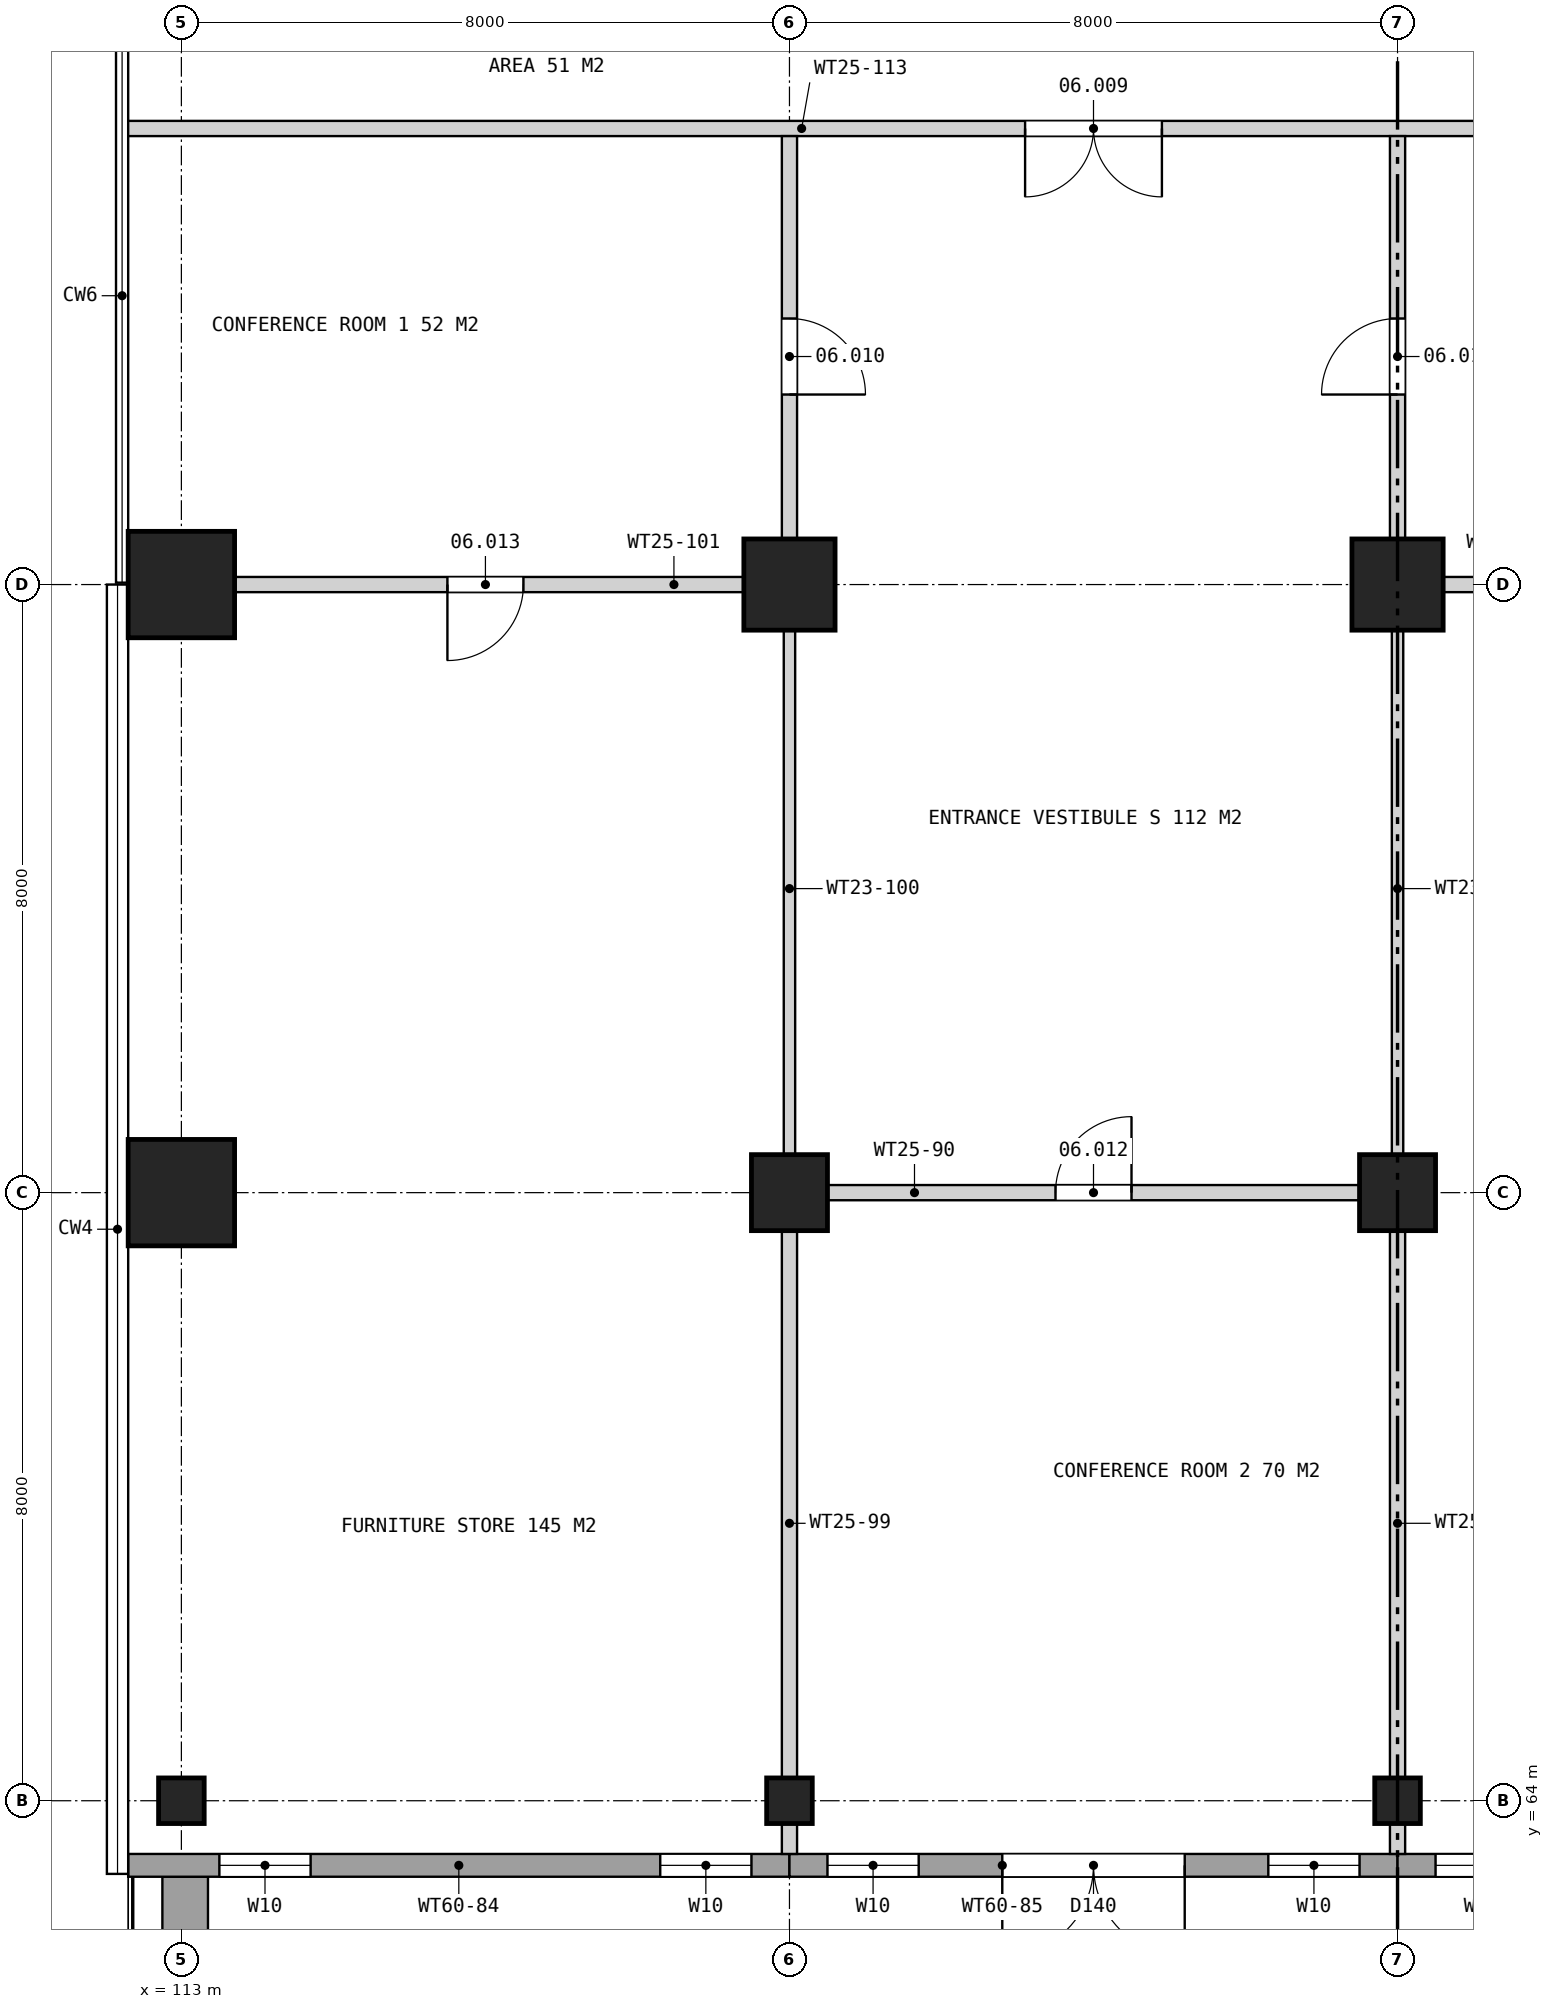
"""IFC4 building model, lengths in metres.
Left out: names, types, materials, properties, quantities, classifications, styles, units other than length and angle.
Written with IfcOpenShell. Run it as: python <this file> out.ifc"""

import sys

from ifc_helpers import new_model, si_unit, direction, frame, frame_2d, origin, origin_2d, place, context, subcontext, project, spatial, rectangle, extrude, element, fill, save


model = new_model("IFC4")
c1 = context("Model", 3, precision=1e-05, world=origin(), true_north=direction((0.0, 1.0)))
c2 = subcontext(c1, "Body", "Model", "MODEL_VIEW")
j1 = project(units=[si_unit("LENGTHUNIT", "METRE"), si_unit("PLANEANGLEUNIT", "RADIAN")], contexts=[c1])
p1 = place(None, origin())
s1 = spatial("IfcSite", under=j1, at=p1, CompositionType="ELEMENT")
p2 = place(p1, origin())
s2 = spatial("IfcBuilding", under=s1, at=p2, CompositionType="ELEMENT")
p3 = place(p2, frame((0.0, 0.0, 47.5)))
s3 = spatial("IfcBuildingStorey", under=s2, at=p3, CompositionType="ELEMENT", Elevation=47.5)
p4 = place(p3, frame((113.0, 64.0, 0.0), z_axis=(0.0, 0.0, 1.0), x_axis=(1.0, 0.0, 0.0)))
e1 = element("IfcColumn", 1, at=p4, inside=s3, PredefinedType="COLUMN", context=c2, shape_type="SweptSolid", body=[
    extrude(rectangle(XDim=0.6, YDim=0.6, at=origin_2d()), origin(), (0.0, 0.0, 1.0), 6.0),
])
for number, where, z_axis, x_axis in (
    (2, (113.0, 72.0, 0.0), (0.0, 0.0, 1.0), (1.0, 0.0, 0.0)),
    (3, (113.0, 80.0, 0.0), (0.0, 0.0, 1.0), (1.0, 0.0, 0.0)),
):
    element("IfcColumn", number, at=place(p3, frame(where, z_axis=z_axis, x_axis=x_axis)), inside=s3, PredefinedType="COLUMN", context=c2, shape_type="SweptSolid", body=[
        extrude(rectangle(XDim=1.4, YDim=1.4, at=origin_2d()), origin(), (0.0, 0.0, 1.0), 6.0),
    ])
p5 = place(p3, frame((121.0, 64.0, 5.2), z_axis=(0.0, 0.0, 1.0), x_axis=(1.0, 0.0, 0.0)))
e4 = element("IfcColumn", 4, at=p5, inside=s3, PredefinedType="COLUMN", context=c2, shape_type="SweptSolid", body=[
    extrude(rectangle(XDim=0.6, YDim=0.6, at=origin_2d()), origin(), (0.0, 0.0, 1.0), 0.8),
])
p6 = place(p3, frame((121.0, 72.0, 5.2), z_axis=(0.0, 0.0, 1.0), x_axis=(1.0, 0.0, 0.0)))
e5 = element("IfcColumn", 5, at=p6, inside=s3, PredefinedType="COLUMN", context=c2, shape_type="SweptSolid", body=[
    extrude(rectangle(XDim=1.0, YDim=1.0, at=origin_2d()), origin(), (0.0, 0.0, 1.0), 0.8),
])
p7 = place(p3, frame((121.0, 80.0, 5.2), z_axis=(0.0, 0.0, 1.0), x_axis=(1.0, 0.0, 0.0)))
e6 = element("IfcColumn", 6, at=p7, inside=s3, PredefinedType="COLUMN", context=c2, shape_type="SweptSolid", body=[
    extrude(rectangle(XDim=1.2, YDim=1.2, at=origin_2d()), origin(), (0.0, 0.0, 1.0), 0.8),
])
p8 = place(p3, frame((129.0, 64.0, 5.2), z_axis=(0.0, 0.0, 1.0), x_axis=(1.0, 0.0, 0.0)))
e7 = element("IfcColumn", 7, at=p8, inside=s3, PredefinedType="COLUMN", context=c2, shape_type="SweptSolid", body=[
    extrude(rectangle(XDim=0.6, YDim=0.6, at=origin_2d()), origin(), (0.0, 0.0, 1.0), 0.8),
])
p9 = place(p3, frame((129.0, 72.0, 5.2), z_axis=(0.0, 0.0, 1.0), x_axis=(1.0, 0.0, 0.0)))
e8 = element("IfcColumn", 8, at=p9, inside=s3, PredefinedType="COLUMN", context=c2, shape_type="SweptSolid", body=[
    extrude(rectangle(XDim=1.0, YDim=1.0, at=origin_2d()), origin(), (0.0, 0.0, 1.0), 0.8),
])
p10 = place(p3, frame((129.0, 80.0, 5.2), z_axis=(0.0, 0.0, 1.0), x_axis=(1.0, 0.0, 0.0)))
e9 = element("IfcColumn", 9, at=p10, inside=s3, PredefinedType="COLUMN", context=c2, shape_type="SweptSolid", body=[
    extrude(rectangle(XDim=1.2, YDim=1.2, at=origin_2d()), origin(), (0.0, 0.0, 1.0), 0.8),
])
p11 = place(p3, frame((113.05, 56.35, 0.0), z_axis=(0.0, 0.0, 1.0), x_axis=(0.0, 1.0, 0.0)))
e10 = element("IfcWall", 10, at=p11, inside=s3, PredefinedType="SOLIDWALL", context=c2, shape_type="SweptSolid", body=[
    extrude(rectangle(XDim=6.65, YDim=0.6, at=frame_2d((3.325, 0.0))), origin(), (0.0, 0.0, 1.0), 0.6),
])
p12 = place(p3, frame((112.3, 63.15, 0.0), z_axis=(0.0, 0.0, 1.0), x_axis=(1.0, 0.0, 0.0)))
e11 = element("IfcWall", 11, at=p12, inside=s3, PredefinedType="SOLIDWALL", context=c2, shape_type="SweptSolid", body=[
    extrude(rectangle(XDim=8.7, YDim=0.3, at=frame_2d((4.35, 0.0))), origin(), (0.0, 0.0, 1.0), 5.26),
])
p13 = place(p12, frame((1.2, 0.0, 0.4)))
e12 = element("IfcOpeningElement", 12, at=p13, cuts=e11, PredefinedType="OPENING", context=c2, shape_type="SweptSolid", body=[
    extrude(rectangle(XDim=1.2, YDim=2.2, at=frame_2d((0.6, 1.1))), frame((0.0, 0.16, 0.0), z_axis=(0.0, -1.0, 0.0), x_axis=(1.0, 0.0, 0.0)), (0.0, 0.0, 1.0), 0.32),
])
p14 = place(p12, frame((7.0, 0.0, 0.4)))
e13 = element("IfcOpeningElement", 13, at=p14, cuts=e11, PredefinedType="OPENING", context=c2, shape_type="SweptSolid", body=[
    extrude(rectangle(XDim=1.2, YDim=2.2, at=frame_2d((0.6, 1.1))), frame((0.0, 0.16, 0.0), z_axis=(0.0, -1.0, 0.0), x_axis=(1.0, 0.0, 0.0)), (0.0, 0.0, 1.0), 0.32),
])
p15 = place(p3, frame((121.0, 63.15, 0.0), z_axis=(0.0, 0.0, 1.0), x_axis=(1.0, 0.0, 0.0)))
e14 = element("IfcWall", 14, at=p15, inside=s3, PredefinedType="SOLIDWALL", context=c2, shape_type="SweptSolid", body=[
    extrude(rectangle(XDim=8.0, YDim=0.3, at=frame_2d((4.0, 0.0))), origin(), (0.0, 0.0, 1.0), 5.26),
])
p16 = place(p15, frame((2.8, 0.0, 0.0)))
e15 = element("IfcOpeningElement", 15, at=p16, cuts=e14, PredefinedType="OPENING", context=c2, shape_type="SweptSolid", body=[
    extrude(rectangle(XDim=2.4, YDim=2.4, at=frame_2d((1.2, 1.2))), frame((0.0, 0.16, 0.0), z_axis=(0.0, -1.0, 0.0), x_axis=(1.0, 0.0, 0.0)), (0.0, 0.0, 1.0), 0.32),
])
p17 = place(p15, frame((0.5, 0.0, 0.4)))
e16 = element("IfcOpeningElement", 16, at=p17, cuts=e14, PredefinedType="OPENING", context=c2, shape_type="SweptSolid", body=[
    extrude(rectangle(XDim=1.2, YDim=2.2, at=frame_2d((0.6, 1.1))), frame((0.0, 0.16, 0.0), z_axis=(0.0, -1.0, 0.0), x_axis=(1.0, 0.0, 0.0)), (0.0, 0.0, 1.0), 0.32),
])
p18 = place(p15, frame((6.3, 0.0, 0.4)))
e17 = element("IfcOpeningElement", 17, at=p18, cuts=e14, PredefinedType="OPENING", context=c2, shape_type="SweptSolid", body=[
    extrude(rectangle(XDim=1.2, YDim=2.2, at=frame_2d((0.6, 1.1))), frame((0.0, 0.16, 0.0), z_axis=(0.0, -1.0, 0.0), x_axis=(1.0, 0.0, 0.0)), (0.0, 0.0, 1.0), 0.32),
])
p19 = place(p3, frame((129.0, 63.15, 0.0), z_axis=(0.0, 0.0, 1.0), x_axis=(1.0, 0.0, 0.0)))
e18 = element("IfcWall", 18, at=p19, inside=s3, PredefinedType="SOLIDWALL", context=c2, shape_type="SweptSolid", body=[
    extrude(rectangle(XDim=8.98, YDim=0.3, at=frame_2d((4.49, 0.0))), origin(), (0.0, 0.0, 1.0), 5.26),
])
p20 = place(p19, frame((0.5, 0.0, 0.4)))
e19 = element("IfcOpeningElement", 19, at=p20, cuts=e18, PredefinedType="OPENING", context=c2, shape_type="SweptSolid", body=[
    extrude(rectangle(XDim=1.2, YDim=2.2, at=frame_2d((0.6, 1.1))), frame((0.0, 0.16, 0.0), z_axis=(0.0, -1.0, 0.0), x_axis=(1.0, 0.0, 0.0)), (0.0, 0.0, 1.0), 0.32),
])
p21 = place(p19, frame((6.3, 0.0, 0.4)))
e20 = element("IfcOpeningElement", 20, at=p21, cuts=e18, PredefinedType="OPENING", context=c2, shape_type="SweptSolid", body=[
    extrude(rectangle(XDim=1.2, YDim=2.2, at=frame_2d((0.6, 1.1))), frame((0.0, 0.16, 0.0), z_axis=(0.0, -1.0, 0.0), x_axis=(1.0, 0.0, 0.0)), (0.0, 0.0, 1.0), 0.32),
])
p22 = place(p3, frame((121.075, 72.0, 0.0), z_axis=(0.0, 0.0, 1.0), x_axis=(1.0, 0.0, 0.0)))
e21 = element("IfcWall", 21, at=p22, inside=s3, PredefinedType="PARTITIONING", context=c2, shape_type="SweptSolid", body=[
    extrude(rectangle(XDim=7.85, YDim=0.2, at=frame_2d((3.925, 0.0))), origin(), (0.0, 0.0, 1.0), 2.7),
])
p23 = place(p22, frame((3.425, 0.0, 0.0)))
e22 = element("IfcOpeningElement", 22, at=p23, cuts=e21, PredefinedType="OPENING", context=c2, shape_type="SweptSolid", body=[
    extrude(rectangle(XDim=1.0, YDim=2.1, at=frame_2d((0.5, 1.05))), frame((0.0, 0.11, 0.0), z_axis=(0.0, -1.0, 0.0), x_axis=(1.0, 0.0, 0.0)), (0.0, 0.0, 1.0), 0.22),
])
p24 = place(p3, frame((113.7, 80.0, 0.0), z_axis=(0.0, 0.0, 1.0), x_axis=(1.0, 0.0, 0.0)))
e23 = element("IfcWall", 23, at=p24, inside=s3, PredefinedType="PARTITIONING", context=c2, shape_type="SweptSolid", body=[
    extrude(rectangle(XDim=7.225, YDim=0.2, at=frame_2d((3.613, 0.0))), origin(), (0.0, 0.0, 1.0), 2.7),
])
p25 = place(p24, frame((2.8, 0.0, 0.0)))
e24 = element("IfcOpeningElement", 24, at=p25, cuts=e23, PredefinedType="OPENING", context=c2, shape_type="SweptSolid", body=[
    extrude(rectangle(XDim=1.0, YDim=2.1, at=frame_2d((0.5, 1.05))), frame((0.0, 0.11, 0.0), z_axis=(0.0, -1.0, 0.0), x_axis=(1.0, 0.0, 0.0)), (0.0, 0.0, 1.0), 0.22),
])
p26 = place(p3, frame((129.075, 80.0, 0.0), z_axis=(0.0, 0.0, 1.0), x_axis=(1.0, 0.0, 0.0)))
e25 = element("IfcWall", 25, at=p26, inside=s3, PredefinedType="PARTITIONING", context=c2, shape_type="SweptSolid", body=[
    extrude(rectangle(XDim=7.225, YDim=0.2, at=frame_2d((3.613, 0.0))), origin(), (0.0, 0.0, 1.0), 2.7),
])
p27 = place(p26, frame((3.425, 0.0, 0.0)))
e26 = element("IfcOpeningElement", 26, at=p27, cuts=e25, PredefinedType="OPENING", context=c2, shape_type="SweptSolid", body=[
    extrude(rectangle(XDim=1.0, YDim=2.1, at=frame_2d((0.5, 1.05))), frame((0.0, 0.11, 0.0), z_axis=(0.0, -1.0, 0.0), x_axis=(1.0, 0.0, 0.0)), (0.0, 0.0, 1.0), 0.22),
])
p28 = place(p3, frame((112.2, 86.0, 0.0), z_axis=(0.0, 0.0, 1.0), x_axis=(1.0, 0.0, 0.0)))
e27 = element("IfcWall", 27, at=p28, inside=s3, PredefinedType="PARTITIONING", context=c2, shape_type="SweptSolid", body=[
    extrude(rectangle(XDim=25.6, YDim=0.2, at=frame_2d((12.8, 0.0))), origin(), (0.0, 0.0, 1.0), 5.26),
])
p29 = place(p28, frame((11.9, 0.0, 0.0)))
e28 = element("IfcOpeningElement", 28, at=p29, cuts=e27, PredefinedType="OPENING", context=c2, shape_type="SweptSolid", body=[
    extrude(rectangle(XDim=1.8, YDim=2.4, at=frame_2d((0.9, 1.2))), frame((0.0, 0.11, 0.0), z_axis=(0.0, -1.0, 0.0), x_axis=(1.0, 0.0, 0.0)), (0.0, 0.0, 1.0), 0.22),
])
p30 = place(p3, frame((121.0, 63.3, 0.0), z_axis=(0.0, 0.0, 1.0), x_axis=(0.0, 1.0, 0.0)))
e29 = element("IfcWall", 29, at=p30, inside=s3, PredefinedType="PARTITIONING", context=c2, shape_type="SweptSolid", body=[
    extrude(rectangle(XDim=8.7, YDim=0.2, at=frame_2d((4.35, 0.0))), origin(), (0.0, 0.0, 1.0), 2.7),
])
p31 = place(p3, frame((121.0, 72.0, 0.0), z_axis=(0.0, 0.0, 1.0), x_axis=(0.0, 1.0, 0.0)))
e30 = element("IfcWall", 30, at=p31, inside=s3, PredefinedType="PARTITIONING", context=c2, shape_type="SweptSolid", body=[
    extrude(rectangle(XDim=8.0, YDim=0.15, at=frame_2d((4.0, 0.0))), origin(), (0.0, 0.0, 1.0), 2.7),
])
p32 = place(p3, frame((121.0, 80.0, 0.0), z_axis=(0.0, 0.0, 1.0), x_axis=(0.0, 1.0, 0.0)))
e31 = element("IfcWall", 31, at=p32, inside=s3, PredefinedType="PARTITIONING", context=c2, shape_type="SweptSolid", body=[
    extrude(rectangle(XDim=5.9, YDim=0.2, at=frame_2d((2.95, 0.0))), origin(), (0.0, 0.0, 1.0), 2.7),
])
p33 = place(p32, frame((2.5, 0.0, 0.0)))
e32 = element("IfcOpeningElement", 32, at=p33, cuts=e31, PredefinedType="OPENING", context=c2, shape_type="SweptSolid", body=[
    extrude(rectangle(XDim=1.0, YDim=2.1, at=frame_2d((0.5, 1.05))), frame((0.0, 0.11, 0.0), z_axis=(0.0, -1.0, 0.0), x_axis=(1.0, 0.0, 0.0)), (0.0, 0.0, 1.0), 0.22),
])
p34 = place(p3, frame((129.0, 63.3, 0.0), z_axis=(0.0, 0.0, 1.0), x_axis=(0.0, 1.0, 0.0)))
e33 = element("IfcWall", 33, at=p34, inside=s3, PredefinedType="PARTITIONING", context=c2, shape_type="SweptSolid", body=[
    extrude(rectangle(XDim=8.7, YDim=0.2, at=frame_2d((4.35, 0.0))), origin(), (0.0, 0.0, 1.0), 2.7),
])
p35 = place(p3, frame((129.0, 72.0, 0.0), z_axis=(0.0, 0.0, 1.0), x_axis=(0.0, 1.0, 0.0)))
e34 = element("IfcWall", 34, at=p35, inside=s3, PredefinedType="PARTITIONING", context=c2, shape_type="SweptSolid", body=[
    extrude(rectangle(XDim=8.0, YDim=0.15, at=frame_2d((4.0, 0.0))), origin(), (0.0, 0.0, 1.0), 2.7),
])
p36 = place(p3, frame((129.0, 80.0, 0.0), z_axis=(0.0, 0.0, 1.0), x_axis=(0.0, 1.0, 0.0)))
e35 = element("IfcWall", 35, at=p36, inside=s3, PredefinedType="PARTITIONING", context=c2, shape_type="SweptSolid", body=[
    extrude(rectangle(XDim=5.9, YDim=0.2, at=frame_2d((2.95, 0.0))), origin(), (0.0, 0.0, 1.0), 2.7),
])
p37 = place(p36, frame((2.5, 0.0, 0.0)))
e36 = element("IfcOpeningElement", 36, at=p37, cuts=e35, PredefinedType="OPENING", context=c2, shape_type="SweptSolid", body=[
    extrude(rectangle(XDim=1.0, YDim=2.1, at=frame_2d((0.5, 1.05))), frame((0.0, 0.11, 0.0), z_axis=(0.0, -1.0, 0.0), x_axis=(1.0, 0.0, 0.0)), (0.0, 0.0, 1.0), 0.22),
])
p38 = place(p13, origin())
e37 = element("IfcWindow", 37, at=p38, inside=s3, PartitioningType="SINGLE_PANEL", PredefinedType="WINDOW", context=c2, shape_type="SweptSolid", body=[
    extrude(rectangle(XDim=1.2, YDim=2.2, at=frame_2d((0.6, 1.1))), frame((0.0, 0.03, 0.0), z_axis=(0.0, -1.0, 0.0), x_axis=(1.0, 0.0, 0.0)), (0.0, 0.0, 1.0), 0.06),
])
fill(e12, e37)
p39 = place(p14, origin())
e38 = element("IfcWindow", 38, at=p39, inside=s3, PartitioningType="SINGLE_PANEL", PredefinedType="WINDOW", context=c2, shape_type="SweptSolid", body=[
    extrude(rectangle(XDim=1.2, YDim=2.2, at=frame_2d((0.6, 1.1))), frame((0.0, 0.03, 0.0), z_axis=(0.0, -1.0, 0.0), x_axis=(1.0, 0.0, 0.0)), (0.0, 0.0, 1.0), 0.06),
])
fill(e13, e38)
p40 = place(p16, frame((2.4, 0.0, 0.0), z_axis=(0.0, 0.0, 1.0), x_axis=(-1.0, 0.0, 0.0)))
e39 = element("IfcDoor", 39, at=p40, inside=s3, OperationType="DOUBLE_DOOR_SINGLE_SWING", PredefinedType="DOOR", context=c2, shape_type="SweptSolid", body=[
    extrude(rectangle(XDim=2.4, YDim=2.4, at=frame_2d((1.2, 1.2))), frame((0.0, 0.025, 0.0), z_axis=(0.0, -1.0, 0.0), x_axis=(1.0, 0.0, 0.0)), (0.0, 0.0, 1.0), 0.05),
])
fill(e15, e39)
p41 = place(p17, origin())
e40 = element("IfcWindow", 40, at=p41, inside=s3, PartitioningType="SINGLE_PANEL", PredefinedType="WINDOW", context=c2, shape_type="SweptSolid", body=[
    extrude(rectangle(XDim=1.2, YDim=2.2, at=frame_2d((0.6, 1.1))), frame((0.0, 0.03, 0.0), z_axis=(0.0, -1.0, 0.0), x_axis=(1.0, 0.0, 0.0)), (0.0, 0.0, 1.0), 0.06),
])
fill(e16, e40)
p42 = place(p18, origin())
e41 = element("IfcWindow", 41, at=p42, inside=s3, PartitioningType="SINGLE_PANEL", PredefinedType="WINDOW", context=c2, shape_type="SweptSolid", body=[
    extrude(rectangle(XDim=1.2, YDim=2.2, at=frame_2d((0.6, 1.1))), frame((0.0, 0.03, 0.0), z_axis=(0.0, -1.0, 0.0), x_axis=(1.0, 0.0, 0.0)), (0.0, 0.0, 1.0), 0.06),
])
fill(e17, e41)
p43 = place(p20, origin())
e42 = element("IfcWindow", 42, at=p43, inside=s3, PartitioningType="SINGLE_PANEL", PredefinedType="WINDOW", context=c2, shape_type="SweptSolid", body=[
    extrude(rectangle(XDim=1.2, YDim=2.2, at=frame_2d((0.6, 1.1))), frame((0.0, 0.03, 0.0), z_axis=(0.0, -1.0, 0.0), x_axis=(1.0, 0.0, 0.0)), (0.0, 0.0, 1.0), 0.06),
])
fill(e19, e42)
p44 = place(p29, frame((1.8, 0.0, 0.0), z_axis=(0.0, 0.0, 1.0), x_axis=(-1.0, 0.0, 0.0)))
e43 = element("IfcDoor", 43, at=p44, inside=s3, OperationType="DOUBLE_DOOR_SINGLE_SWING", PredefinedType="DOOR", context=c2, shape_type="SweptSolid", body=[
    extrude(rectangle(XDim=1.8, YDim=2.4, at=frame_2d((0.9, 1.2))), frame((0.0, 0.025, 0.0), z_axis=(0.0, -1.0, 0.0), x_axis=(1.0, 0.0, 0.0)), (0.0, 0.0, 1.0), 0.05),
])
fill(e28, e43)
p45 = place(p33, frame((1.0, 0.0, 0.0), z_axis=(0.0, 0.0, 1.0), x_axis=(-1.0, 0.0, 0.0)))
e44 = element("IfcDoor", 44, at=p45, inside=s3, OperationType="SINGLE_SWING_RIGHT", PredefinedType="DOOR", context=c2, shape_type="SweptSolid", body=[
    extrude(rectangle(XDim=1.0, YDim=2.1, at=frame_2d((0.5, 1.05))), frame((0.0, 0.025, 0.0), z_axis=(0.0, -1.0, 0.0), x_axis=(1.0, 0.0, 0.0)), (0.0, 0.0, 1.0), 0.05),
])
fill(e32, e44)
p46 = place(p37, origin())
e45 = element("IfcDoor", 45, at=p46, inside=s3, OperationType="SINGLE_SWING_LEFT", PredefinedType="DOOR", context=c2, shape_type="SweptSolid", body=[
    extrude(rectangle(XDim=1.0, YDim=2.1, at=frame_2d((0.5, 1.05))), frame((0.0, 0.025, 0.0), z_axis=(0.0, -1.0, 0.0), x_axis=(1.0, 0.0, 0.0)), (0.0, 0.0, 1.0), 0.05),
])
fill(e36, e45)
p47 = place(p23, origin())
e46 = element("IfcDoor", 46, at=p47, inside=s3, OperationType="SINGLE_SWING_RIGHT", PredefinedType="DOOR", context=c2, shape_type="SweptSolid", body=[
    extrude(rectangle(XDim=1.0, YDim=2.1, at=frame_2d((0.5, 1.05))), frame((0.0, 0.025, 0.0), z_axis=(0.0, -1.0, 0.0), x_axis=(1.0, 0.0, 0.0)), (0.0, 0.0, 1.0), 0.05),
])
fill(e22, e46)
p48 = place(p25, frame((1.0, 0.0, 0.0), z_axis=(0.0, 0.0, 1.0), x_axis=(-1.0, 0.0, 0.0)))
e47 = element("IfcDoor", 47, at=p48, inside=s3, OperationType="SINGLE_SWING_RIGHT", PredefinedType="DOOR", context=c2, shape_type="SweptSolid", body=[
    extrude(rectangle(XDim=1.0, YDim=2.1, at=frame_2d((0.5, 1.05))), frame((0.0, 0.025, 0.0), z_axis=(0.0, -1.0, 0.0), x_axis=(1.0, 0.0, 0.0)), (0.0, 0.0, 1.0), 0.05),
])
fill(e24, e47)
save(model, sys.argv[1])
